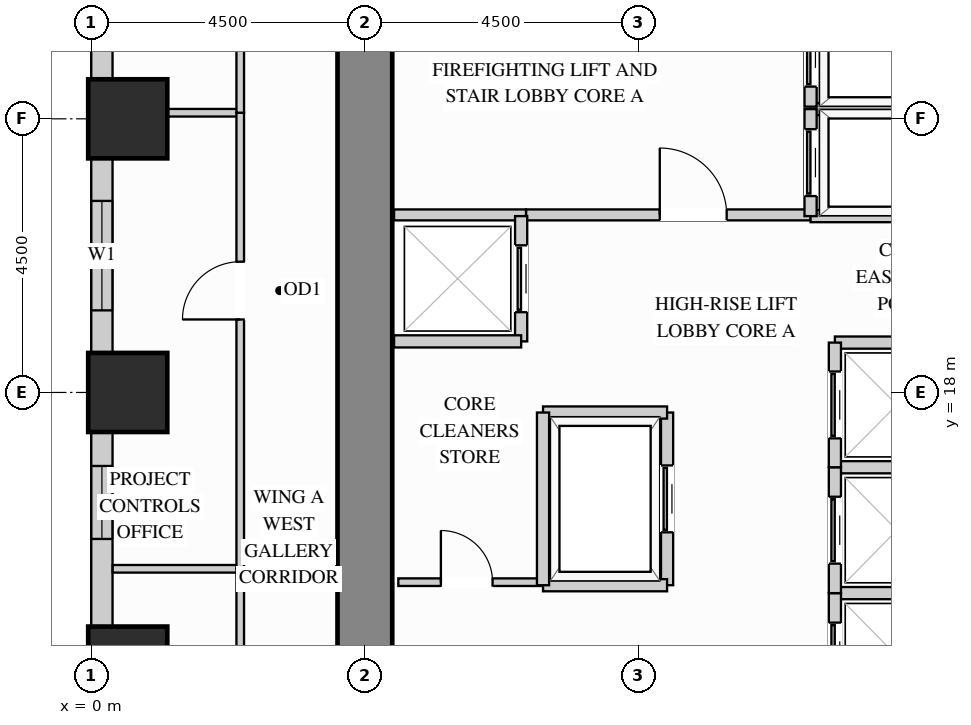
"""IFC4 building model, lengths in metres.
Left out: names, types, materials, properties, quantities, classifications, styles, units other than length and angle.
Written with IfcOpenShell. Run it as: python <this file> out.ifc"""

import sys

from ifc_helpers import new_model, si_unit, direction, frame, frame_2d, origin, origin_2d, place, context, subcontext, project, spatial, rectangle, extrude, source, transform, mapped, element, fill, save


model = new_model("IFC4")
c1 = context("Model", 3, precision=1e-05, world=origin(), true_north=direction((0.0, 1.0)))
c2 = subcontext(c1, "Body", "Model", "MODEL_VIEW")
j1 = project(units=[si_unit("LENGTHUNIT", "METRE"), si_unit("PLANEANGLEUNIT", "RADIAN")], contexts=[c1])
p1 = place(None, origin())
s1 = spatial("IfcSite", under=j1, at=p1, CompositionType="ELEMENT")
p2 = place(p1, origin())
s2 = spatial("IfcBuilding", under=s1, at=p2, CompositionType="ELEMENT")
p3 = place(p2, frame((0.0, 0.0, 26.1)))
s3 = spatial("IfcBuildingStorey", under=s2, at=p3, CompositionType="ELEMENT", Elevation=26.1)
m1 = source(origin(), c2, "Body", "SweptSolid", [
    extrude(rectangle(XDim=1.3, YDim=1.3, at=origin_2d()), origin(), (0.0, 0.0, 1.0), 3.38),
])
for number, where, z_axis, x_axis in (
    (1, (0.6, 13.5, 0.0), (0.0, 0.0, 1.0), (1.0, 0.0, 0.0)),
    (2, (0.6, 18.0, 0.0), (0.0, 0.0, 1.0), (1.0, 0.0, 0.0)),
    (3, (0.6, 22.5, 0.0), (0.0, 0.0, 1.0), (1.0, 0.0, 0.0)),
):
    element("IfcColumn", number, at=place(p3, frame(where, z_axis=z_axis, x_axis=x_axis)), inside=s3, PredefinedType="COLUMN", context=c2, shape_type="MappedRepresentation", body=[
        mapped(m1, transform((0.0, 0.0, 0.0), x_axis=(1.0, 0.0, 0.0), y_axis=(0.0, 1.0, 0.0), z_axis=(0.0, 0.0, 1.0))),
    ])
m2 = source(origin(), c2, "Body", "SweptSolid", [
    extrude(rectangle(XDim=20.1, YDim=0.9, at=frame_2d((10.05, 0.0))), origin(), (0.0, 0.0, 1.0), 3.38),
])
p4 = place(p3, frame((4.5, 8.95, 0.0), z_axis=(0.0, 0.0, 1.0), x_axis=(0.0, 1.0, 0.0)))
e4 = element("IfcWall", 4, at=p4, inside=s3, PredefinedType="SHEAR", context=c2, shape_type="MappedRepresentation", body=[
    mapped(m2, transform((0.0, 0.0, 0.0), x_axis=(1.0, 0.0, 0.0), y_axis=(0.0, 1.0, 0.0), z_axis=(0.0, 0.0, 1.0))),
])
p5 = place(p3, frame((0.175, 26.152, 0.0), z_axis=(0.0, 0.0, 1.0), x_axis=(0.0, -1.0, 0.0)))
e5 = element("IfcWall", 5, at=p5, inside=s3, PredefinedType="SOLIDWALL", context=c2, shape_type="SweptSolid", body=[
    extrude(rectangle(XDim=3.004, YDim=0.35, at=frame_2d((1.502, 0.0))), origin(), (0.0, 0.0, 1.0), 2.51),
])
p6 = place(p5, frame((0.602, 0.0, 0.78)))
e6 = element("IfcOpeningElement", 6, at=p6, cuts=e5, PredefinedType="OPENING", context=c2, shape_type="SweptSolid", body=[
    extrude(rectangle(XDim=1.8, YDim=1.55, at=frame_2d((0.9, 0.775))), frame((0.0, 0.185, 0.0), z_axis=(0.0, -1.0, 0.0), x_axis=(1.0, 0.0, 0.0)), (0.0, 0.0, 1.0), 0.37),
])
p7 = place(p3, frame((0.175, 21.852, 0.0), z_axis=(0.0, 0.0, 1.0), x_axis=(0.0, -1.0, 0.0)))
e7 = element("IfcWall", 7, at=p7, inside=s3, PredefinedType="SOLIDWALL", context=c2, shape_type="SweptSolid", body=[
    extrude(rectangle(XDim=3.204, YDim=0.35, at=frame_2d((1.602, 0.0))), origin(), (0.0, 0.0, 1.0), 2.51),
])
p8 = place(p7, frame((0.702, 0.0, 0.78)))
e8 = element("IfcOpeningElement", 8, at=p8, cuts=e7, PredefinedType="OPENING", context=c2, shape_type="SweptSolid", body=[
    extrude(rectangle(XDim=1.8, YDim=1.55, at=frame_2d((0.9, 0.775))), frame((0.0, 0.185, 0.0), z_axis=(0.0, -1.0, 0.0), x_axis=(1.0, 0.0, 0.0)), (0.0, 0.0, 1.0), 0.37),
])
p9 = place(p3, frame((0.175, 17.352, 0.0), z_axis=(0.0, 0.0, 1.0), x_axis=(0.0, -1.0, 0.0)))
e9 = element("IfcWall", 9, at=p9, inside=s3, PredefinedType="SOLIDWALL", context=c2, shape_type="SweptSolid", body=[
    extrude(rectangle(XDim=3.204, YDim=0.35, at=frame_2d((1.602, 0.0))), origin(), (0.0, 0.0, 1.0), 2.51),
])
p10 = place(p9, frame((0.561, 0.0, 0.78)))
e10 = element("IfcOpeningElement", 10, at=p10, cuts=e9, PredefinedType="OPENING", context=c2, shape_type="SweptSolid", body=[
    extrude(rectangle(XDim=1.2, YDim=1.55, at=frame_2d((0.6, 0.775))), frame((0.0, 0.185, 0.0), z_axis=(0.0, -1.0, 0.0), x_axis=(1.0, 0.0, 0.0)), (0.0, 0.0, 1.0), 0.37),
])
p11 = place(p3, frame((7.15, 20.92, 0.0), z_axis=(0.0, 0.0, 1.0), x_axis=(1.0, 0.0, 0.0)))
e11 = element("IfcWall", 11, at=p11, inside=s3, PredefinedType="PARTITIONING", context=c2, shape_type="SweptSolid", body=[
    extrude(rectangle(XDim=4.68, YDim=0.18, at=frame_2d((2.34, 0.0))), origin(), (0.0, 0.0, 1.0), 3.365),
])
p12 = place(p11, frame((2.2, 0.0, 0.0)))
e12 = element("IfcOpeningElement", 12, at=p12, cuts=e11, PredefinedType="OPENING", context=c2, shape_type="SweptSolid", body=[
    extrude(rectangle(XDim=1.1, YDim=2.15, at=frame_2d((0.55, 1.075))), frame((0.0, 0.1, 0.0), z_axis=(0.0, -1.0, 0.0), x_axis=(1.0, 0.0, 0.0)), (0.0, 0.0, 1.0), 0.2),
])
m3 = source(origin(), c2, "Body", "SweptSolid", [
    extrude(rectangle(XDim=2.17, YDim=0.18, at=frame_2d((1.085, 0.0))), origin(), (0.0, 0.0, 1.0), 3.365),
])
p13 = place(p3, frame((4.98, 20.92, 0.0), z_axis=(0.0, 0.0, 1.0), x_axis=(1.0, 0.0, 0.0)))
e13 = element("IfcWall", 13, at=p13, inside=s3, PredefinedType="PARTITIONING", context=c2, shape_type="MappedRepresentation", body=[
    mapped(m3, transform((0.0, 0.0, 0.0), x_axis=(1.0, 0.0, 0.0), y_axis=(0.0, 1.0, 0.0), z_axis=(0.0, 0.0, 1.0))),
])
p14 = place(p3, frame((5.05, 14.88, 0.0), z_axis=(0.0, 0.0, 1.0), x_axis=(1.0, 0.0, 0.0)))
e14 = element("IfcWall", 14, at=p14, inside=s3, PredefinedType="PARTITIONING", context=c2, shape_type="SweptSolid", body=[
    extrude(rectangle(XDim=2.35, YDim=0.125, at=frame_2d((1.175, 0.0))), origin(), (0.0, 0.0, 1.0), 3.365),
])
p15 = place(p14, frame((0.7, 0.0, 0.0)))
e15 = element("IfcOpeningElement", 15, at=p15, cuts=e14, PredefinedType="OPENING", context=c2, shape_type="SweptSolid", body=[
    extrude(rectangle(XDim=0.85, YDim=2.1, at=frame_2d((0.425, 1.05))), frame((0.0, 0.073, 0.0), z_axis=(0.0, -1.0, 0.0), x_axis=(1.0, 0.0, 0.0)), (0.0, 0.0, 1.0), 0.145),
])
m4 = source(origin(), c2, "Body", "SweptSolid", [
    extrude(rectangle(XDim=2.098, YDim=0.125, at=frame_2d((1.049, 0.0))), origin(), (0.0, 0.0, 1.0), 3.365),
])
p16 = place(p3, frame((0.352, 15.1, 0.0), z_axis=(0.0, 0.0, 1.0), x_axis=(1.0, 0.0, 0.0)))
e16 = element("IfcWall", 16, at=p16, inside=s3, PredefinedType="PARTITIONING", context=c2, shape_type="MappedRepresentation", body=[
    mapped(m4, transform((0.0, 0.0, 0.0), x_axis=(1.0, 0.0, 0.0), y_axis=(0.0, 1.0, 0.0), z_axis=(0.0, 0.0, 1.0))),
])
m5 = source(origin(), c2, "Body", "SweptSolid", [
    extrude(rectangle(XDim=1.19, YDim=0.125, at=frame_2d((0.595, 0.0))), origin(), (0.0, 0.0, 1.0), 3.365),
])
p17 = place(p3, frame((1.26, 22.6, 0.0), z_axis=(0.0, 0.0, 1.0), x_axis=(1.0, 0.0, 0.0)))
e17 = element("IfcWall", 17, at=p17, inside=s3, PredefinedType="PARTITIONING", context=c2, shape_type="MappedRepresentation", body=[
    mapped(m5, transform((0.0, 0.0, 0.0), x_axis=(1.0, 0.0, 0.0), y_axis=(0.0, 1.0, 0.0), z_axis=(0.0, 0.0, 1.0))),
])
p18 = place(p3, frame((2.45, 7.85, 0.0), z_axis=(0.0, 0.0, 1.0), x_axis=(0.0, 1.0, 0.0)))
e18 = element("IfcWall", 18, at=p18, inside=s3, PredefinedType="PARTITIONING", context=c2, shape_type="SweptSolid", body=[
    extrude(rectangle(XDim=7.25, YDim=0.125, at=frame_2d((3.625, 0.0))), origin(), (0.0, 0.0, 1.0), 3.365),
])
p19 = place(p18, frame((3.15, 0.0, 0.0)))
e19 = element("IfcOpeningElement", 19, at=p19, cuts=e18, PredefinedType="OPENING", context=c2, shape_type="SweptSolid", body=[
    extrude(rectangle(XDim=0.95, YDim=2.15, at=frame_2d((0.475, 1.075))), frame((0.0, 0.073, 0.0), z_axis=(0.0, -1.0, 0.0), x_axis=(1.0, 0.0, 0.0)), (0.0, 0.0, 1.0), 0.145),
])
p20 = place(p3, frame((2.45, 15.1, 0.0), z_axis=(0.0, 0.0, 1.0), x_axis=(0.0, 1.0, 0.0)))
e20 = element("IfcWall", 20, at=p20, inside=s3, PredefinedType="PARTITIONING", context=c2, shape_type="SweptSolid", body=[
    extrude(rectangle(XDim=7.5, YDim=0.125, at=frame_2d((3.75, 0.0))), origin(), (0.0, 0.0, 1.0), 3.365),
])
p21 = place(p20, frame((4.1, 0.0, 0.0)))
e21 = element("IfcOpeningElement", 21, at=p21, cuts=e20, PredefinedType="OPENING", context=c2, shape_type="SweptSolid", body=[
    extrude(rectangle(XDim=0.95, YDim=2.15, at=frame_2d((0.475, 1.075))), frame((0.0, 0.073, 0.0), z_axis=(0.0, -1.0, 0.0), x_axis=(1.0, 0.0, 0.0)), (0.0, 0.0, 1.0), 0.145),
])
p22 = place(p3, frame((2.45, 22.6, 0.0), z_axis=(0.0, 0.0, 1.0), x_axis=(0.0, 1.0, 0.0)))
e22 = element("IfcWall", 22, at=p22, inside=s3, PredefinedType="PARTITIONING", context=c2, shape_type="SweptSolid", body=[
    extrude(rectangle(XDim=7.45, YDim=0.125, at=frame_2d((3.725, 0.0))), origin(), (0.0, 0.0, 1.0), 3.365),
])
p23 = place(p22, frame((2.227, 0.0, 0.0)))
e23 = element("IfcOpeningElement", 23, at=p23, cuts=e22, PredefinedType="OPENING", context=c2, shape_type="SweptSolid", body=[
    extrude(rectangle(XDim=0.95, YDim=2.15, at=frame_2d((0.475, 1.075))), frame((0.0, 0.073, 0.0), z_axis=(0.0, -1.0, 0.0), x_axis=(1.0, 0.0, 0.0)), (0.0, 0.0, 1.0), 0.145),
])
m6 = source(origin(), c2, "Body", "SweptSolid", [
    extrude(rectangle(XDim=2.19, YDim=0.2, at=frame_2d((1.095, 0.0))), origin(), (0.0, 0.0, 1.0), 3.365),
])
for number, where, z_axis, x_axis in (
    (24, (11.83, 22.66, 0.0), (0.0, 0.0, 1.0), (1.0, 0.0, 0.0)),
    (25, (11.83, 20.9, 0.0), (0.0, 0.0, 1.0), (1.0, 0.0, 0.0)),
):
    element("IfcWall", number, at=place(p3, frame(where, z_axis=z_axis, x_axis=x_axis)), inside=s3, PredefinedType="PARTITIONING", context=c2, shape_type="MappedRepresentation", body=[
        mapped(m6, transform((0.0, 0.0, 0.0), x_axis=(1.0, 0.0, 0.0), y_axis=(0.0, 1.0, 0.0), z_axis=(0.0, 0.0, 1.0))),
    ])
p24 = place(p3, frame((11.83, 20.9, 0.0), z_axis=(0.0, 0.0, 1.0), x_axis=(0.0, 1.0, 0.0)))
e26 = element("IfcWall", 26, at=p24, inside=s3, PredefinedType="PARTITIONING", context=c2, shape_type="SweptSolid", body=[
    extrude(rectangle(XDim=1.76, YDim=0.2, at=frame_2d((0.88, 0.0))), origin(), (0.0, 0.0, 1.0), 3.365),
])
p25 = place(p24, frame((0.33, 0.0, 0.0)))
e27 = element("IfcOpeningElement", 27, at=p25, cuts=e26, PredefinedType="OPENING", context=c2, shape_type="SweptSolid", body=[
    extrude(rectangle(XDim=1.1, YDim=2.2, at=frame_2d((0.55, 1.1))), frame((0.0, 0.11, 0.0), z_axis=(0.0, -1.0, 0.0), x_axis=(1.0, 0.0, 0.0)), (0.0, 0.0, 1.0), 0.22),
])
p26 = place(p3, frame((11.83, 22.7, 0.0), z_axis=(0.0, 0.0, 1.0), x_axis=(0.0, 1.0, 0.0)))
e28 = element("IfcWall", 28, at=p26, inside=s3, PredefinedType="PARTITIONING", context=c2, shape_type="SweptSolid", body=[
    extrude(rectangle(XDim=1.76, YDim=0.2, at=frame_2d((0.88, 0.0))), origin(), (0.0, 0.0, 1.0), 3.365),
])
p27 = place(p26, frame((0.33, 0.0, 0.0)))
e29 = element("IfcOpeningElement", 29, at=p27, cuts=e28, PredefinedType="OPENING", context=c2, shape_type="SweptSolid", body=[
    extrude(rectangle(XDim=1.1, YDim=2.2, at=frame_2d((0.55, 1.1))), frame((0.0, 0.11, 0.0), z_axis=(0.0, -1.0, 0.0), x_axis=(1.0, 0.0, 0.0)), (0.0, 0.0, 1.0), 0.22),
])
m7 = source(origin(), c2, "Body", "SweptSolid", [
    extrude(rectangle(XDim=1.79, YDim=0.2, at=frame_2d((0.895, 0.0))), origin(), (0.0, 0.0, 1.0), 3.365),
])
p28 = place(p3, frame((12.23, 14.7, 0.0), z_axis=(0.0, 0.0, 1.0), x_axis=(1.0, 0.0, 0.0)))
e30 = element("IfcWall", 30, at=p28, inside=s3, PredefinedType="PARTITIONING", context=c2, shape_type="MappedRepresentation", body=[
    mapped(m7, transform((0.0, 0.0, 0.0), x_axis=(1.0, 0.0, 0.0), y_axis=(0.0, 1.0, 0.0), z_axis=(0.0, 0.0, 1.0))),
])
p29 = place(p3, frame((12.23, 12.63, 0.0), z_axis=(0.0, 0.0, 1.0), x_axis=(0.0, 1.0, 0.0)))
e31 = element("IfcWall", 31, at=p29, inside=s3, PredefinedType="PARTITIONING", context=c2, shape_type="SweptSolid", body=[
    extrude(rectangle(XDim=2.07, YDim=0.2, at=frame_2d((1.035, 0.0))), origin(), (0.0, 0.0, 1.0), 3.365),
])
p30 = place(p29, frame((0.485, 0.0, 0.0)))
e32 = element("IfcOpeningElement", 32, at=p30, cuts=e31, PredefinedType="OPENING", context=c2, shape_type="SweptSolid", body=[
    extrude(rectangle(XDim=1.1, YDim=2.2, at=frame_2d((0.55, 1.1))), frame((0.0, 0.11, 0.0), z_axis=(0.0, -1.0, 0.0), x_axis=(1.0, 0.0, 0.0)), (0.0, 0.0, 1.0), 0.22),
])
p31 = place(p3, frame((12.23, 16.77, 0.0), z_axis=(0.0, 0.0, 1.0), x_axis=(1.0, 0.0, 0.0)))
e33 = element("IfcWall", 33, at=p31, inside=s3, PredefinedType="PARTITIONING", context=c2, shape_type="MappedRepresentation", body=[
    mapped(m7, transform((0.0, 0.0, 0.0), x_axis=(1.0, 0.0, 0.0), y_axis=(0.0, 1.0, 0.0), z_axis=(0.0, 0.0, 1.0))),
])
p32 = place(p3, frame((12.23, 14.7, 0.0), z_axis=(0.0, 0.0, 1.0), x_axis=(0.0, 1.0, 0.0)))
e34 = element("IfcWall", 34, at=p32, inside=s3, PredefinedType="PARTITIONING", context=c2, shape_type="SweptSolid", body=[
    extrude(rectangle(XDim=2.07, YDim=0.2, at=frame_2d((1.035, 0.0))), origin(), (0.0, 0.0, 1.0), 3.365),
])
p33 = place(p32, frame((0.485, 0.0, 0.0)))
e35 = element("IfcOpeningElement", 35, at=p33, cuts=e34, PredefinedType="OPENING", context=c2, shape_type="SweptSolid", body=[
    extrude(rectangle(XDim=1.1, YDim=2.2, at=frame_2d((0.55, 1.1))), frame((0.0, 0.11, 0.0), z_axis=(0.0, -1.0, 0.0), x_axis=(1.0, 0.0, 0.0)), (0.0, 0.0, 1.0), 0.22),
])
p34 = place(p3, frame((12.23, 18.82, 0.0), z_axis=(0.0, 0.0, 1.0), x_axis=(1.0, 0.0, 0.0)))
e36 = element("IfcWall", 36, at=p34, inside=s3, PredefinedType="PARTITIONING", context=c2, shape_type="MappedRepresentation", body=[
    mapped(m7, transform((0.0, 0.0, 0.0), x_axis=(1.0, 0.0, 0.0), y_axis=(0.0, 1.0, 0.0), z_axis=(0.0, 0.0, 1.0))),
])
p35 = place(p3, frame((12.23, 16.77, 0.0), z_axis=(0.0, 0.0, 1.0), x_axis=(0.0, 1.0, 0.0)))
e37 = element("IfcWall", 37, at=p35, inside=s3, PredefinedType="PARTITIONING", context=c2, shape_type="SweptSolid", body=[
    extrude(rectangle(XDim=2.05, YDim=0.2, at=frame_2d((1.025, 0.0))), origin(), (0.0, 0.0, 1.0), 3.365),
])
p36 = place(p35, frame((0.475, 0.0, 0.0)))
e38 = element("IfcOpeningElement", 38, at=p36, cuts=e37, PredefinedType="OPENING", context=c2, shape_type="SweptSolid", body=[
    extrude(rectangle(XDim=1.1, YDim=2.2, at=frame_2d((0.55, 1.1))), frame((0.0, 0.11, 0.0), z_axis=(0.0, -1.0, 0.0), x_axis=(1.0, 0.0, 0.0)), (0.0, 0.0, 1.0), 0.22),
])
p37 = place(p3, frame((7.07, 18.84, 0.0), z_axis=(0.0, 0.0, 1.0), x_axis=(0.0, 1.0, 0.0)))
e39 = element("IfcWall", 39, at=p37, inside=s3, PredefinedType="PARTITIONING", context=c2, shape_type="SweptSolid", body=[
    extrude(rectangle(XDim=2.06, YDim=0.2, at=frame_2d((1.03, 0.0))), origin(), (0.0, 0.0, 1.0), 3.365),
])
p38 = place(p37, frame((0.48, 0.0, 0.0)))
e40 = element("IfcOpeningElement", 40, at=p38, cuts=e39, PredefinedType="OPENING", context=c2, shape_type="SweptSolid", body=[
    extrude(rectangle(XDim=1.1, YDim=2.2, at=frame_2d((0.55, 1.1))), frame((0.0, 0.11, 0.0), z_axis=(0.0, -1.0, 0.0), x_axis=(1.0, 0.0, 0.0)), (0.0, 0.0, 1.0), 0.22),
])
m8 = source(origin(), c2, "Body", "SweptSolid", [
    extrude(rectangle(XDim=2.09, YDim=0.2, at=frame_2d((1.045, 0.0))), origin(), (0.0, 0.0, 1.0), 3.365),
])
p39 = place(p3, frame((4.98, 18.84, 0.0), z_axis=(0.0, 0.0, 1.0), x_axis=(1.0, 0.0, 0.0)))
e41 = element("IfcWall", 41, at=p39, inside=s3, PredefinedType="PARTITIONING", context=c2, shape_type="MappedRepresentation", body=[
    mapped(m8, transform((0.0, 0.0, 0.0), x_axis=(1.0, 0.0, 0.0), y_axis=(0.0, 1.0, 0.0), z_axis=(0.0, 0.0, 1.0))),
])
p40 = place(p3, frame((9.47, 14.83, 0.0), z_axis=(0.0, 0.0, 1.0), x_axis=(0.0, 1.0, 0.0)))
e42 = element("IfcWall", 42, at=p40, inside=s3, PredefinedType="PARTITIONING", context=c2, shape_type="SweptSolid", body=[
    extrude(rectangle(XDim=2.84, YDim=0.2, at=frame_2d((1.42, 0.0))), origin(), (0.0, 0.0, 1.0), 3.365),
])
p41 = place(p40, frame((0.87, 0.0, 0.0)))
e43 = element("IfcOpeningElement", 43, at=p41, cuts=e42, PredefinedType="OPENING", context=c2, shape_type="SweptSolid", body=[
    extrude(rectangle(XDim=1.1, YDim=2.2, at=frame_2d((0.55, 1.1))), frame((0.0, 0.11, 0.0), z_axis=(0.0, -1.0, 0.0), x_axis=(1.0, 0.0, 0.0)), (0.0, 0.0, 1.0), 0.22),
])
m9 = source(origin(), c2, "Body", "SweptSolid", [
    extrude(rectangle(XDim=2.04, YDim=0.2, at=frame_2d((1.02, 0.0))), origin(), (0.0, 0.0, 1.0), 3.365),
])
for number, where, z_axis, x_axis in (
    (44, (7.43, 17.67, 0.0), (0.0, 0.0, 1.0), (1.0, 0.0, 0.0)),
    (45, (7.43, 14.83, 0.0), (0.0, 0.0, 1.0), (1.0, 0.0, 0.0)),
):
    element("IfcWall", number, at=place(p3, frame(where, z_axis=z_axis, x_axis=x_axis)), inside=s3, PredefinedType="PARTITIONING", context=c2, shape_type="MappedRepresentation", body=[
        mapped(m9, transform((0.0, 0.0, 0.0), x_axis=(1.0, 0.0, 0.0), y_axis=(0.0, 1.0, 0.0), z_axis=(0.0, 0.0, 1.0))),
    ])
m10 = source(origin(), c2, "Body", "SweptSolid", [
    extrude(rectangle(XDim=2.84, YDim=0.2, at=frame_2d((1.42, 0.0))), origin(), (0.0, 0.0, 1.0), 3.365),
])
p42 = place(p3, frame((7.43, 14.83, 0.0), z_axis=(0.0, 0.0, 1.0), x_axis=(0.0, 1.0, 0.0)))
e46 = element("IfcWall", 46, at=p42, inside=s3, PredefinedType="PARTITIONING", context=c2, shape_type="MappedRepresentation", body=[
    mapped(m10, transform((0.0, 0.0, 0.0), x_axis=(1.0, 0.0, 0.0), y_axis=(0.0, 1.0, 0.0), z_axis=(0.0, 0.0, 1.0))),
])
m11 = source(origin(), c2, "Body", "SweptSolid", [
    extrude(rectangle(XDim=1.1, YDim=2.15, at=frame_2d((0.55, 1.075))), frame((0.0, 0.025, 0.0), z_axis=(0.0, -1.0, 0.0), x_axis=(1.0, 0.0, 0.0)), (0.0, 0.0, 1.0), 0.05),
])
p43 = place(p12, origin())
e47 = element("IfcDoor", 47, at=p43, inside=s3, OperationType="SINGLE_SWING_LEFT", PredefinedType="DOOR", context=c2, shape_type="MappedRepresentation", body=[
    mapped(m11, transform((0.0, 0.0, 0.0), x_axis=(1.0, 0.0, 0.0), y_axis=(0.0, 1.0, 0.0), z_axis=(0.0, 0.0, 1.0))),
])
fill(e12, e47)
m12 = source(origin(), c2, "Body", "SweptSolid", [
    extrude(rectangle(XDim=1.1, YDim=2.2, at=frame_2d((0.55, 1.1))), frame((0.0, 0.025, 0.0), z_axis=(0.0, -1.0, 0.0), x_axis=(1.0, 0.0, 0.0)), (0.0, 0.0, 1.0), 0.05),
])
p44 = place(p25, origin())
e48 = element("IfcDoor", 48, at=p44, inside=s3, OperationType="SLIDING_TO_LEFT", PredefinedType="DOOR", context=c2, shape_type="MappedRepresentation", body=[
    mapped(m12, transform((0.0, 0.0, 0.0), x_axis=(1.0, 0.0, 0.0), y_axis=(0.0, 1.0, 0.0), z_axis=(0.0, 0.0, 1.0))),
])
fill(e27, e48)
p45 = place(p27, origin())
e49 = element("IfcDoor", 49, at=p45, inside=s3, OperationType="SLIDING_TO_LEFT", PredefinedType="DOOR", context=c2, shape_type="MappedRepresentation", body=[
    mapped(m12, transform((0.0, 0.0, 0.0), x_axis=(1.0, 0.0, 0.0), y_axis=(0.0, 1.0, 0.0), z_axis=(0.0, 0.0, 1.0))),
])
fill(e29, e49)
p46 = place(p30, origin())
e50 = element("IfcDoor", 50, at=p46, inside=s3, OperationType="SLIDING_TO_LEFT", PredefinedType="DOOR", context=c2, shape_type="MappedRepresentation", body=[
    mapped(m12, transform((0.0, 0.0, 0.0), x_axis=(1.0, 0.0, 0.0), y_axis=(0.0, 1.0, 0.0), z_axis=(0.0, 0.0, 1.0))),
])
fill(e32, e50)
p47 = place(p33, origin())
e51 = element("IfcDoor", 51, at=p47, inside=s3, OperationType="SLIDING_TO_LEFT", PredefinedType="DOOR", context=c2, shape_type="MappedRepresentation", body=[
    mapped(m12, transform((0.0, 0.0, 0.0), x_axis=(1.0, 0.0, 0.0), y_axis=(0.0, 1.0, 0.0), z_axis=(0.0, 0.0, 1.0))),
])
fill(e35, e51)
p48 = place(p36, origin())
e52 = element("IfcDoor", 52, at=p48, inside=s3, OperationType="SLIDING_TO_LEFT", PredefinedType="DOOR", context=c2, shape_type="MappedRepresentation", body=[
    mapped(m12, transform((0.0, 0.0, 0.0), x_axis=(1.0, 0.0, 0.0), y_axis=(0.0, 1.0, 0.0), z_axis=(0.0, 0.0, 1.0))),
])
fill(e38, e52)
p49 = place(p38, origin())
e53 = element("IfcDoor", 53, at=p49, inside=s3, OperationType="SLIDING_TO_LEFT", PredefinedType="DOOR", context=c2, shape_type="MappedRepresentation", body=[
    mapped(m12, transform((0.0, 0.0, 0.0), x_axis=(1.0, 0.0, 0.0), y_axis=(0.0, 1.0, 0.0), z_axis=(0.0, 0.0, 1.0))),
])
fill(e40, e53)
p50 = place(p41, origin())
e54 = element("IfcDoor", 54, at=p50, inside=s3, OperationType="SLIDING_TO_LEFT", PredefinedType="DOOR", context=c2, shape_type="MappedRepresentation", body=[
    mapped(m12, transform((0.0, 0.0, 0.0), x_axis=(1.0, 0.0, 0.0), y_axis=(0.0, 1.0, 0.0), z_axis=(0.0, 0.0, 1.0))),
])
fill(e43, e54)
m13 = source(origin(), c2, "Body", "SweptSolid", [
    extrude(rectangle(XDim=0.95, YDim=2.15, at=frame_2d((0.475, 1.075))), frame((0.0, 0.025, 0.0), z_axis=(0.0, -1.0, 0.0), x_axis=(1.0, 0.0, 0.0)), (0.0, 0.0, 1.0), 0.05),
])
p51 = place(p21, origin())
e55 = element("IfcDoor", 55, at=p51, inside=s3, OperationType="SINGLE_SWING_LEFT", PredefinedType="DOOR", context=c2, shape_type="MappedRepresentation", body=[
    mapped(m13, transform((0.0, 0.0, 0.0), x_axis=(1.0, 0.0, 0.0), y_axis=(0.0, 1.0, 0.0), z_axis=(0.0, 0.0, 1.0))),
])
fill(e21, e55)
m14 = source(origin(), c2, "Body", "SweptSolid", [
    extrude(rectangle(XDim=0.85, YDim=2.1, at=frame_2d((0.425, 1.05))), frame((0.0, 0.025, 0.0), z_axis=(0.0, -1.0, 0.0), x_axis=(1.0, 0.0, 0.0)), (0.0, 0.0, 1.0), 0.05),
])
p52 = place(p15, origin())
e56 = element("IfcDoor", 56, at=p52, inside=s3, OperationType="SINGLE_SWING_LEFT", PredefinedType="DOOR", context=c2, shape_type="MappedRepresentation", body=[
    mapped(m14, transform((0.0, 0.0, 0.0), x_axis=(1.0, 0.0, 0.0), y_axis=(0.0, 1.0, 0.0), z_axis=(0.0, 0.0, 1.0))),
])
fill(e15, e56)
m15 = source(origin(), c2, "Body", "SweptSolid", [
    extrude(rectangle(XDim=1.8, YDim=1.55, at=frame_2d((0.9, 0.775))), frame((0.0, 0.03, 0.0), z_axis=(0.0, -1.0, 0.0), x_axis=(1.0, 0.0, 0.0)), (0.0, 0.0, 1.0), 0.06),
])
p53 = place(p8, origin())
e57 = element("IfcWindow", 57, at=p53, inside=s3, PartitioningType="SINGLE_PANEL", PredefinedType="WINDOW", context=c2, shape_type="MappedRepresentation", body=[
    mapped(m15, transform((0.0, 0.0, 0.0), x_axis=(1.0, 0.0, 0.0), y_axis=(0.0, 1.0, 0.0), z_axis=(0.0, 0.0, 1.0))),
])
fill(e8, e57)
m16 = source(origin(), c2, "Body", "SweptSolid", [
    extrude(rectangle(XDim=1.2, YDim=1.55, at=frame_2d((0.6, 0.775))), frame((0.0, 0.03, 0.0), z_axis=(0.0, -1.0, 0.0), x_axis=(1.0, 0.0, 0.0)), (0.0, 0.0, 1.0), 0.06),
])
p54 = place(p10, origin())
e58 = element("IfcWindow", 58, at=p54, inside=s3, PartitioningType="SINGLE_PANEL", PredefinedType="WINDOW", context=c2, shape_type="MappedRepresentation", body=[
    mapped(m16, transform((0.0, 0.0, 0.0), x_axis=(1.0, 0.0, 0.0), y_axis=(0.0, 1.0, 0.0), z_axis=(0.0, 0.0, 1.0))),
])
fill(e10, e58)
save(model, sys.argv[1])
